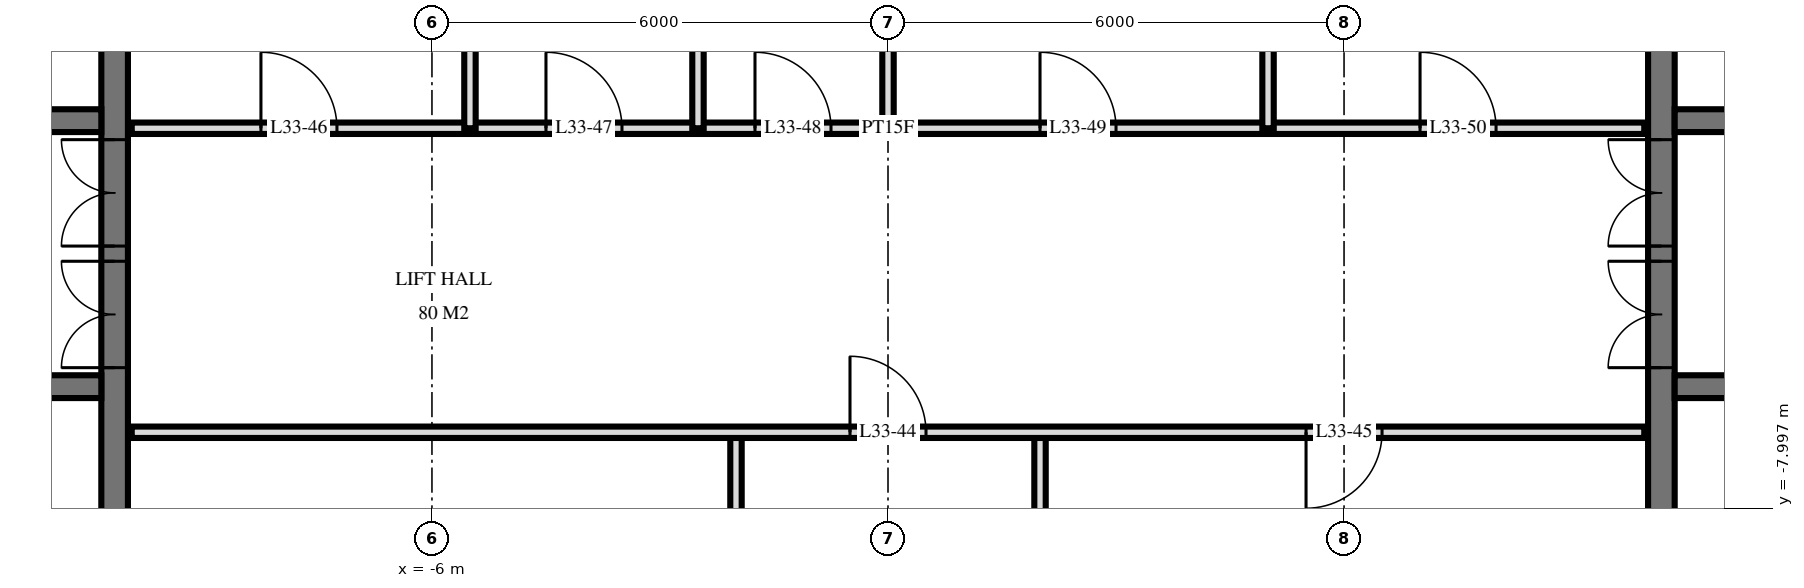
"""IFC4 building model, lengths in metres.
Left out: names, types, materials, properties, quantities, classifications, styles, units other than length and angle.
Written with IfcOpenShell. Run it as: python <this file> out.ifc"""

import sys

from ifc_helpers import new_model, si_unit, direction, frame, frame_2d, origin, place, context, subcontext, project, spatial, rectangle, extrude, element, fill, save


model = new_model("IFC4")
c1 = context("Model", 3, precision=1e-05, world=origin(), true_north=direction((0.0, 1.0)))
c2 = subcontext(c1, "Body", "Model", "MODEL_VIEW")
j1 = project(units=[si_unit("LENGTHUNIT", "METRE"), si_unit("PLANEANGLEUNIT", "RADIAN")], contexts=[c1])
p1 = place(None, origin())
s1 = spatial("IfcSite", under=j1, at=p1, CompositionType="ELEMENT")
p2 = place(p1, origin())
s2 = spatial("IfcBuilding", under=s1, at=p2, CompositionType="ELEMENT")
p3 = place(p2, frame((0.0, 0.0, 130.8)))
s3 = spatial("IfcBuildingStorey", under=s2, at=p3, CompositionType="ELEMENT", Elevation=130.8)
p4 = place(p3, frame((-10.175, -14.55, 0.0), z_axis=(0.0, 0.0, 1.0), x_axis=(0.0, 1.0, 0.0)))
e1 = element("IfcWall", 1, at=p4, inside=s3, PredefinedType="SHEAR", context=c2, shape_type="SweptSolid", body=[
    extrude(rectangle(XDim=14.1, YDim=0.35, at=frame_2d((7.05, 0.0))), origin(), (0.0, 0.0, 1.0), 3.6),
])
p5 = place(p4, frame((8.4, 0.0, 0.0)))
e2 = element("IfcOpeningElement", 2, at=p5, cuts=e1, PredefinedType="OPENING", context=c2, shape_type="SweptSolid", body=[
    extrude(rectangle(XDim=1.4, YDim=2.4, at=frame_2d((0.7, 1.2))), frame((0.0, 0.185, 0.0), z_axis=(0.0, -1.0, 0.0), x_axis=(1.0, 0.0, 0.0)), (0.0, 0.0, 1.0), 0.37),
])
p6 = place(p4, frame((10.0, 0.0, 0.0)))
e3 = element("IfcOpeningElement", 3, at=p6, cuts=e1, PredefinedType="OPENING", context=c2, shape_type="SweptSolid", body=[
    extrude(rectangle(XDim=1.4, YDim=2.4, at=frame_2d((0.7, 1.2))), frame((0.0, 0.185, 0.0), z_axis=(0.0, -1.0, 0.0), x_axis=(1.0, 0.0, 0.0)), (0.0, 0.0, 1.0), 0.37),
])
p7 = place(p4, frame((4.0, 0.0, 0.0)))
e4 = element("IfcOpeningElement", 4, at=p7, cuts=e1, PredefinedType="OPENING", context=c2, shape_type="SweptSolid", body=[
    extrude(rectangle(XDim=1.2, YDim=2.1, at=frame_2d((0.6, 1.05))), frame((0.0, 0.185, 0.0), z_axis=(0.0, -1.0, 0.0), x_axis=(1.0, 0.0, 0.0)), (0.0, 0.0, 1.0), 0.37),
])
p8 = place(p3, frame((-24.05, -2.9, 0.0), z_axis=(0.0, 0.0, 1.0), x_axis=(1.0, 0.0, 0.0)))
e5 = element("IfcWall", 5, at=p8, inside=s3, PredefinedType="SHEAR", context=c2, shape_type="SweptSolid", body=[
    extrude(rectangle(XDim=13.7, YDim=0.3, at=frame_2d((6.85, 0.0))), origin(), (0.0, 0.0, 1.0), 3.6),
])
p9 = place(p8, frame((0.55, 0.0, 0.0)))
e6 = element("IfcOpeningElement", 6, at=p9, cuts=e5, PredefinedType="OPENING", context=c2, shape_type="SweptSolid", body=[
    extrude(rectangle(XDim=1.1, YDim=2.1, at=frame_2d((0.55, 1.05))), frame((0.0, 0.16, 0.0), z_axis=(0.0, -1.0, 0.0), x_axis=(1.0, 0.0, 0.0)), (0.0, 0.0, 1.0), 0.32),
])
p10 = place(p8, frame((5.9, 0.0, 0.0)))
e7 = element("IfcOpeningElement", 7, at=p10, cuts=e5, PredefinedType="OPENING", context=c2, shape_type="SweptSolid", body=[
    extrude(rectangle(XDim=0.9, YDim=2.1, at=frame_2d((0.45, 1.05))), frame((0.0, 0.16, 0.0), z_axis=(0.0, -1.0, 0.0), x_axis=(1.0, 0.0, 0.0)), (0.0, 0.0, 1.0), 0.32),
])
p11 = place(p8, frame((11.85, 0.0, 0.0)))
e8 = element("IfcOpeningElement", 8, at=p11, cuts=e5, PredefinedType="OPENING", context=c2, shape_type="SweptSolid", body=[
    extrude(rectangle(XDim=1.0, YDim=2.1, at=frame_2d((0.5, 1.05))), frame((0.0, 0.16, 0.0), z_axis=(0.0, -1.0, 0.0), x_axis=(1.0, 0.0, 0.0)), (0.0, 0.0, 1.0), 0.32),
])
p12 = place(p8, frame((9.312, 0.0, 0.0)))
e9 = element("IfcOpeningElement", 9, at=p12, cuts=e5, PredefinedType="OPENING", context=c2, shape_type="SweptSolid", body=[
    extrude(rectangle(XDim=1.0, YDim=2.1, at=frame_2d((0.5, 1.05))), frame((0.0, 0.16, 0.0), z_axis=(0.0, -1.0, 0.0), x_axis=(1.0, 0.0, 0.0)), (0.0, 0.0, 1.0), 0.32),
])
p13 = place(p8, frame((7.887, 0.0, 0.0)))
e10 = element("IfcOpeningElement", 10, at=p13, cuts=e5, PredefinedType="OPENING", context=c2, shape_type="SweptSolid", body=[
    extrude(rectangle(XDim=1.0, YDim=2.1, at=frame_2d((0.5, 1.05))), frame((0.0, 0.16, 0.0), z_axis=(0.0, -1.0, 0.0), x_axis=(1.0, 0.0, 0.0)), (0.0, 0.0, 1.0), 0.32),
])
p14 = place(p8, frame((3.0, 0.0, 0.0)))
e11 = element("IfcOpeningElement", 11, at=p14, cuts=e5, PredefinedType="OPENING", context=c2, shape_type="SweptSolid", body=[
    extrude(rectangle(XDim=1.0, YDim=2.1, at=frame_2d((0.5, 1.05))), frame((0.0, 0.16, 0.0), z_axis=(0.0, -1.0, 0.0), x_axis=(1.0, 0.0, 0.0)), (0.0, 0.0, 1.0), 0.32),
])
p15 = place(p3, frame((-24.05, -6.4, 0.0), z_axis=(0.0, 0.0, 1.0), x_axis=(1.0, 0.0, 0.0)))
e12 = element("IfcWall", 12, at=p15, inside=s3, PredefinedType="SHEAR", context=c2, shape_type="SweptSolid", body=[
    extrude(rectangle(XDim=13.7, YDim=0.3, at=frame_2d((6.85, 0.0))), origin(), (0.0, 0.0, 1.0), 3.6),
])
p16 = place(p15, frame((0.55, 0.0, 0.0)))
e13 = element("IfcOpeningElement", 13, at=p16, cuts=e12, PredefinedType="OPENING", context=c2, shape_type="SweptSolid", body=[
    extrude(rectangle(XDim=1.1, YDim=2.1, at=frame_2d((0.55, 1.05))), frame((0.0, 0.16, 0.0), z_axis=(0.0, -1.0, 0.0), x_axis=(1.0, 0.0, 0.0)), (0.0, 0.0, 1.0), 0.32),
])
p17 = place(p15, frame((5.8, 0.0, 0.0)))
e14 = element("IfcOpeningElement", 14, at=p17, cuts=e12, PredefinedType="OPENING", context=c2, shape_type="SweptSolid", body=[
    extrude(rectangle(XDim=1.1, YDim=2.1, at=frame_2d((0.55, 1.05))), frame((0.0, 0.16, 0.0), z_axis=(0.0, -1.0, 0.0), x_axis=(1.0, 0.0, 0.0)), (0.0, 0.0, 1.0), 0.32),
])
p18 = place(p3, frame((10.175, -14.55, 0.0), z_axis=(0.0, 0.0, 1.0), x_axis=(0.0, 1.0, 0.0)))
e15 = element("IfcWall", 15, at=p18, inside=s3, PredefinedType="SHEAR", context=c2, shape_type="SweptSolid", body=[
    extrude(rectangle(XDim=14.1, YDim=0.35, at=frame_2d((7.05, 0.0))), origin(), (0.0, 0.0, 1.0), 3.6),
])
p19 = place(p18, frame((8.4, 0.0, 0.0)))
e16 = element("IfcOpeningElement", 16, at=p19, cuts=e15, PredefinedType="OPENING", context=c2, shape_type="SweptSolid", body=[
    extrude(rectangle(XDim=1.4, YDim=2.4, at=frame_2d((0.7, 1.2))), frame((0.0, 0.185, 0.0), z_axis=(0.0, -1.0, 0.0), x_axis=(1.0, 0.0, 0.0)), (0.0, 0.0, 1.0), 0.37),
])
p20 = place(p18, frame((10.0, 0.0, 0.0)))
e17 = element("IfcOpeningElement", 17, at=p20, cuts=e15, PredefinedType="OPENING", context=c2, shape_type="SweptSolid", body=[
    extrude(rectangle(XDim=1.4, YDim=2.4, at=frame_2d((0.7, 1.2))), frame((0.0, 0.185, 0.0), z_axis=(0.0, -1.0, 0.0), x_axis=(1.0, 0.0, 0.0)), (0.0, 0.0, 1.0), 0.37),
])
p21 = place(p18, frame((4.0, 0.0, 0.0)))
e18 = element("IfcOpeningElement", 18, at=p21, cuts=e15, PredefinedType="OPENING", context=c2, shape_type="SweptSolid", body=[
    extrude(rectangle(XDim=1.2, YDim=2.1, at=frame_2d((0.6, 1.05))), frame((0.0, 0.185, 0.0), z_axis=(0.0, -1.0, 0.0), x_axis=(1.0, 0.0, 0.0)), (0.0, 0.0, 1.0), 0.37),
])
p22 = place(p3, frame((10.35, -2.9, 0.0), z_axis=(0.0, 0.0, 1.0), x_axis=(1.0, 0.0, 0.0)))
e19 = element("IfcWall", 19, at=p22, inside=s3, PredefinedType="SHEAR", context=c2, shape_type="SweptSolid", body=[
    extrude(rectangle(XDim=13.7, YDim=0.3, at=frame_2d((6.85, 0.0))), origin(), (0.0, 0.0, 1.0), 3.6),
])
p23 = place(p22, frame((12.05, 0.0, 0.0)))
e20 = element("IfcOpeningElement", 20, at=p23, cuts=e19, PredefinedType="OPENING", context=c2, shape_type="SweptSolid", body=[
    extrude(rectangle(XDim=1.1, YDim=2.1, at=frame_2d((0.55, 1.05))), frame((0.0, 0.16, 0.0), z_axis=(0.0, -1.0, 0.0), x_axis=(1.0, 0.0, 0.0)), (0.0, 0.0, 1.0), 0.32),
])
p24 = place(p22, frame((6.9, 0.0, 0.0)))
e21 = element("IfcOpeningElement", 21, at=p24, cuts=e19, PredefinedType="OPENING", context=c2, shape_type="SweptSolid", body=[
    extrude(rectangle(XDim=0.9, YDim=2.1, at=frame_2d((0.45, 1.05))), frame((0.0, 0.16, 0.0), z_axis=(0.0, -1.0, 0.0), x_axis=(1.0, 0.0, 0.0)), (0.0, 0.0, 1.0), 0.32),
])
p25 = place(p22, frame((0.85, 0.0, 0.0)))
e22 = element("IfcOpeningElement", 22, at=p25, cuts=e19, PredefinedType="OPENING", context=c2, shape_type="SweptSolid", body=[
    extrude(rectangle(XDim=1.0, YDim=2.1, at=frame_2d((0.5, 1.05))), frame((0.0, 0.16, 0.0), z_axis=(0.0, -1.0, 0.0), x_axis=(1.0, 0.0, 0.0)), (0.0, 0.0, 1.0), 0.32),
])
p26 = place(p22, frame((3.387, 0.0, 0.0)))
e23 = element("IfcOpeningElement", 23, at=p26, cuts=e19, PredefinedType="OPENING", context=c2, shape_type="SweptSolid", body=[
    extrude(rectangle(XDim=1.0, YDim=2.1, at=frame_2d((0.5, 1.05))), frame((0.0, 0.16, 0.0), z_axis=(0.0, -1.0, 0.0), x_axis=(1.0, 0.0, 0.0)), (0.0, 0.0, 1.0), 0.32),
])
p27 = place(p22, frame((4.812, 0.0, 0.0)))
e24 = element("IfcOpeningElement", 24, at=p27, cuts=e19, PredefinedType="OPENING", context=c2, shape_type="SweptSolid", body=[
    extrude(rectangle(XDim=1.0, YDim=2.1, at=frame_2d((0.5, 1.05))), frame((0.0, 0.16, 0.0), z_axis=(0.0, -1.0, 0.0), x_axis=(1.0, 0.0, 0.0)), (0.0, 0.0, 1.0), 0.32),
])
p28 = place(p22, frame((9.7, 0.0, 0.0)))
e25 = element("IfcOpeningElement", 25, at=p28, cuts=e19, PredefinedType="OPENING", context=c2, shape_type="SweptSolid", body=[
    extrude(rectangle(XDim=1.0, YDim=2.1, at=frame_2d((0.5, 1.05))), frame((0.0, 0.16, 0.0), z_axis=(0.0, -1.0, 0.0), x_axis=(1.0, 0.0, 0.0)), (0.0, 0.0, 1.0), 0.32),
])
p29 = place(p3, frame((10.35, -6.4, 0.0), z_axis=(0.0, 0.0, 1.0), x_axis=(1.0, 0.0, 0.0)))
e26 = element("IfcWall", 26, at=p29, inside=s3, PredefinedType="SHEAR", context=c2, shape_type="SweptSolid", body=[
    extrude(rectangle(XDim=13.7, YDim=0.3, at=frame_2d((6.85, 0.0))), origin(), (0.0, 0.0, 1.0), 3.6),
])
p30 = place(p29, frame((12.05, 0.0, 0.0)))
e27 = element("IfcOpeningElement", 27, at=p30, cuts=e26, PredefinedType="OPENING", context=c2, shape_type="SweptSolid", body=[
    extrude(rectangle(XDim=1.1, YDim=2.1, at=frame_2d((0.55, 1.05))), frame((0.0, 0.16, 0.0), z_axis=(0.0, -1.0, 0.0), x_axis=(1.0, 0.0, 0.0)), (0.0, 0.0, 1.0), 0.32),
])
p31 = place(p29, frame((6.8, 0.0, 0.0)))
e28 = element("IfcOpeningElement", 28, at=p31, cuts=e26, PredefinedType="OPENING", context=c2, shape_type="SweptSolid", body=[
    extrude(rectangle(XDim=1.1, YDim=2.1, at=frame_2d((0.55, 1.05))), frame((0.0, 0.16, 0.0), z_axis=(0.0, -1.0, 0.0), x_axis=(1.0, 0.0, 0.0)), (0.0, 0.0, 1.0), 0.32),
])
p32 = place(p3, frame((5.0, -3.0, 0.0), z_axis=(0.0, 0.0, 1.0), x_axis=(0.0, 1.0, 0.0)))
e29 = element("IfcWall", 29, at=p32, inside=s3, PredefinedType="PARTITIONING", context=c2, shape_type="SweptSolid", body=[
    extrude(rectangle(XDim=4.02, YDim=0.15, at=frame_2d((2.01, 0.0))), origin(), (0.0, 0.0, 1.0), 3.32),
])
p33 = place(p3, frame((2.0, -11.0, 0.0), z_axis=(0.0, 0.0, 1.0), x_axis=(0.0, 1.0, 0.0)))
e30 = element("IfcWall", 30, at=p33, inside=s3, PredefinedType="PARTITIONING", context=c2, shape_type="SweptSolid", body=[
    extrude(rectangle(XDim=4.0, YDim=0.15, at=frame_2d((2.0, 0.0))), origin(), (0.0, 0.0, 1.0), 3.32),
])
p34 = place(p3, frame((0.0, -3.0, 0.0), z_axis=(0.0, 0.0, 1.0), x_axis=(0.0, 1.0, 0.0)))
e31 = element("IfcWall", 31, at=p34, inside=s3, PredefinedType="PLUMBINGWALL", context=c2, shape_type="SweptSolid", body=[
    extrude(rectangle(XDim=4.02, YDim=0.15, at=frame_2d((2.01, 0.0))), origin(), (0.0, 0.0, 1.0), 3.32),
])
p35 = place(p3, frame((-2.0, -11.0, 0.0), z_axis=(0.0, 0.0, 1.0), x_axis=(0.0, 1.0, 0.0)))
e32 = element("IfcWall", 32, at=p35, inside=s3, PredefinedType="PARTITIONING", context=c2, shape_type="SweptSolid", body=[
    extrude(rectangle(XDim=4.0, YDim=0.15, at=frame_2d((2.0, 0.0))), origin(), (0.0, 0.0, 1.0), 3.32),
])
for number, where, z_axis, x_axis in (
    (33, (-2.5, -3.0, 0.0), (0.0, 0.0, 1.0), (0.0, 1.0, 0.0)),
    (34, (-5.5, -3.0, 0.0), (0.0, 0.0, 1.0), (0.0, 1.0, 0.0)),
):
    element("IfcWall", number, at=place(p3, frame(where, z_axis=z_axis, x_axis=x_axis)), inside=s3, PredefinedType="PLUMBINGWALL", context=c2, shape_type="SweptSolid", body=[
        extrude(rectangle(XDim=4.02, YDim=0.15, at=frame_2d((2.01, 0.0))), origin(), (0.0, 0.0, 1.0), 3.32),
    ])
p36 = place(p3, frame((-9.95, -7.0, 0.0), z_axis=(0.0, 0.0, 1.0), x_axis=(1.0, 0.0, 0.0)))
e35 = element("IfcWall", 35, at=p36, inside=s3, PredefinedType="PARTITIONING", context=c2, shape_type="SweptSolid", body=[
    extrude(rectangle(XDim=19.9, YDim=0.15, at=frame_2d((9.95, 0.0))), origin(), (0.0, 0.0, 1.0), 3.32),
])
p37 = place(p36, frame((9.45, 0.0, 0.0)))
e36 = element("IfcOpeningElement", 36, at=p37, cuts=e35, PredefinedType="OPENING", context=c2, shape_type="SweptSolid", body=[
    extrude(rectangle(XDim=1.0, YDim=2.1, at=frame_2d((0.5, 1.05))), frame((0.0, 0.085, 0.0), z_axis=(0.0, -1.0, 0.0), x_axis=(1.0, 0.0, 0.0)), (0.0, 0.0, 1.0), 0.17),
])
p38 = place(p36, frame((15.45, 0.0, 0.0)))
e37 = element("IfcOpeningElement", 37, at=p38, cuts=e35, PredefinedType="OPENING", context=c2, shape_type="SweptSolid", body=[
    extrude(rectangle(XDim=1.0, YDim=2.1, at=frame_2d((0.5, 1.05))), frame((0.0, 0.085, 0.0), z_axis=(0.0, -1.0, 0.0), x_axis=(1.0, 0.0, 0.0)), (0.0, 0.0, 1.0), 0.17),
])
p39 = place(p3, frame((-9.95, -3.0, 0.0), z_axis=(0.0, 0.0, 1.0), x_axis=(1.0, 0.0, 0.0)))
e38 = element("IfcWall", 38, at=p39, inside=s3, PredefinedType="PARTITIONING", context=c2, shape_type="SweptSolid", body=[
    extrude(rectangle(XDim=19.9, YDim=0.15, at=frame_2d((9.95, 0.0))), origin(), (0.0, 0.0, 1.0), 3.32),
])
p40 = place(p39, frame((1.7, 0.0, 0.0)))
e39 = element("IfcOpeningElement", 39, at=p40, cuts=e38, PredefinedType="OPENING", context=c2, shape_type="SweptSolid", body=[
    extrude(rectangle(XDim=1.0, YDim=2.1, at=frame_2d((0.5, 1.05))), frame((0.0, 0.085, 0.0), z_axis=(0.0, -1.0, 0.0), x_axis=(1.0, 0.0, 0.0)), (0.0, 0.0, 1.0), 0.17),
])
p41 = place(p39, frame((5.45, 0.0, 0.0)))
e40 = element("IfcOpeningElement", 40, at=p41, cuts=e38, PredefinedType="OPENING", context=c2, shape_type="SweptSolid", body=[
    extrude(rectangle(XDim=1.0, YDim=2.1, at=frame_2d((0.5, 1.05))), frame((0.0, 0.085, 0.0), z_axis=(0.0, -1.0, 0.0), x_axis=(1.0, 0.0, 0.0)), (0.0, 0.0, 1.0), 0.17),
])
p42 = place(p39, frame((8.2, 0.0, 0.0)))
e41 = element("IfcOpeningElement", 41, at=p42, cuts=e38, PredefinedType="OPENING", context=c2, shape_type="SweptSolid", body=[
    extrude(rectangle(XDim=1.0, YDim=2.1, at=frame_2d((0.5, 1.05))), frame((0.0, 0.085, 0.0), z_axis=(0.0, -1.0, 0.0), x_axis=(1.0, 0.0, 0.0)), (0.0, 0.0, 1.0), 0.17),
])
p43 = place(p39, frame((11.95, 0.0, 0.0)))
e42 = element("IfcOpeningElement", 42, at=p43, cuts=e38, PredefinedType="OPENING", context=c2, shape_type="SweptSolid", body=[
    extrude(rectangle(XDim=1.0, YDim=2.1, at=frame_2d((0.5, 1.05))), frame((0.0, 0.085, 0.0), z_axis=(0.0, -1.0, 0.0), x_axis=(1.0, 0.0, 0.0)), (0.0, 0.0, 1.0), 0.17),
])
p44 = place(p39, frame((16.95, 0.0, 0.0)))
e43 = element("IfcOpeningElement", 43, at=p44, cuts=e38, PredefinedType="OPENING", context=c2, shape_type="SweptSolid", body=[
    extrude(rectangle(XDim=1.0, YDim=2.1, at=frame_2d((0.5, 1.05))), frame((0.0, 0.085, 0.0), z_axis=(0.0, -1.0, 0.0), x_axis=(1.0, 0.0, 0.0)), (0.0, 0.0, 1.0), 0.17),
])
p45 = place(p5, origin())
e44 = element("IfcDoor", 44, at=p45, inside=s3, OperationType="DOUBLE_DOOR_SINGLE_SWING", PredefinedType="DOOR", context=c2, shape_type="SweptSolid", body=[
    extrude(rectangle(XDim=1.4, YDim=2.4, at=frame_2d((0.7, 1.2))), frame((0.0, 0.025, 0.0), z_axis=(0.0, -1.0, 0.0), x_axis=(1.0, 0.0, 0.0)), (0.0, 0.0, 1.0), 0.05),
])
fill(e2, e44)
p46 = place(p6, origin())
e45 = element("IfcDoor", 45, at=p46, inside=s3, OperationType="DOUBLE_DOOR_SINGLE_SWING", PredefinedType="DOOR", context=c2, shape_type="SweptSolid", body=[
    extrude(rectangle(XDim=1.4, YDim=2.4, at=frame_2d((0.7, 1.2))), frame((0.0, 0.025, 0.0), z_axis=(0.0, -1.0, 0.0), x_axis=(1.0, 0.0, 0.0)), (0.0, 0.0, 1.0), 0.05),
])
fill(e3, e45)
p47 = place(p19, origin())
e46 = element("IfcDoor", 46, at=p47, inside=s3, OperationType="DOUBLE_DOOR_SINGLE_SWING", PredefinedType="DOOR", context=c2, shape_type="SweptSolid", body=[
    extrude(rectangle(XDim=1.4, YDim=2.4, at=frame_2d((0.7, 1.2))), frame((0.0, 0.025, 0.0), z_axis=(0.0, -1.0, 0.0), x_axis=(1.0, 0.0, 0.0)), (0.0, 0.0, 1.0), 0.05),
])
fill(e16, e46)
p48 = place(p20, origin())
e47 = element("IfcDoor", 47, at=p48, inside=s3, OperationType="DOUBLE_DOOR_SINGLE_SWING", PredefinedType="DOOR", context=c2, shape_type="SweptSolid", body=[
    extrude(rectangle(XDim=1.4, YDim=2.4, at=frame_2d((0.7, 1.2))), frame((0.0, 0.025, 0.0), z_axis=(0.0, -1.0, 0.0), x_axis=(1.0, 0.0, 0.0)), (0.0, 0.0, 1.0), 0.05),
])
fill(e17, e47)
p49 = place(p37, origin())
e48 = element("IfcDoor", 48, at=p49, inside=s3, OperationType="SINGLE_SWING_RIGHT", PredefinedType="DOOR", context=c2, shape_type="SweptSolid", body=[
    extrude(rectangle(XDim=1.0, YDim=2.1, at=frame_2d((0.5, 1.05))), frame((0.0, 0.025, 0.0), z_axis=(0.0, -1.0, 0.0), x_axis=(1.0, 0.0, 0.0)), (0.0, 0.0, 1.0), 0.05),
])
fill(e36, e48)
p50 = place(p38, frame((0.5, 0.0, 0.0), z_axis=(0.0, 0.0, 1.0), x_axis=(-1.0, 0.0, 0.0)))
e49 = element("IfcDoor", 49, at=p50, inside=s3, OperationType="SINGLE_SWING_LEFT", PredefinedType="DOOR", context=c2, shape_type="SweptSolid", body=[
    extrude(rectangle(XDim=1.0, YDim=2.1, at=frame_2d((0.0, 1.05))), frame((0.0, -0.025, 0.0), z_axis=(0.0, 1.0, 0.0), x_axis=(-1.0, 0.0, 0.0)), (0.0, 0.0, 1.0), 0.05),
])
fill(e37, e49)
p51 = place(p40, origin())
e50 = element("IfcDoor", 50, at=p51, inside=s3, OperationType="SINGLE_SWING_RIGHT", PredefinedType="DOOR", context=c2, shape_type="SweptSolid", body=[
    extrude(rectangle(XDim=1.0, YDim=2.1, at=frame_2d((0.5, 1.05))), frame((0.0, 0.025, 0.0), z_axis=(0.0, -1.0, 0.0), x_axis=(1.0, 0.0, 0.0)), (0.0, 0.0, 1.0), 0.05),
])
fill(e39, e50)
p52 = place(p41, origin())
e51 = element("IfcDoor", 51, at=p52, inside=s3, OperationType="SINGLE_SWING_RIGHT", PredefinedType="DOOR", context=c2, shape_type="SweptSolid", body=[
    extrude(rectangle(XDim=1.0, YDim=2.1, at=frame_2d((0.5, 1.05))), frame((0.0, 0.025, 0.0), z_axis=(0.0, -1.0, 0.0), x_axis=(1.0, 0.0, 0.0)), (0.0, 0.0, 1.0), 0.05),
])
fill(e40, e51)
p53 = place(p42, origin())
e52 = element("IfcDoor", 52, at=p53, inside=s3, OperationType="SINGLE_SWING_RIGHT", PredefinedType="DOOR", context=c2, shape_type="SweptSolid", body=[
    extrude(rectangle(XDim=1.0, YDim=2.1, at=frame_2d((0.5, 1.05))), frame((0.0, 0.025, 0.0), z_axis=(0.0, -1.0, 0.0), x_axis=(1.0, 0.0, 0.0)), (0.0, 0.0, 1.0), 0.05),
])
fill(e41, e52)
p54 = place(p43, origin())
e53 = element("IfcDoor", 53, at=p54, inside=s3, OperationType="SINGLE_SWING_RIGHT", PredefinedType="DOOR", context=c2, shape_type="SweptSolid", body=[
    extrude(rectangle(XDim=1.0, YDim=2.1, at=frame_2d((0.5, 1.05))), frame((0.0, 0.025, 0.0), z_axis=(0.0, -1.0, 0.0), x_axis=(1.0, 0.0, 0.0)), (0.0, 0.0, 1.0), 0.05),
])
fill(e42, e53)
p55 = place(p44, origin())
e54 = element("IfcDoor", 54, at=p55, inside=s3, OperationType="SINGLE_SWING_RIGHT", PredefinedType="DOOR", context=c2, shape_type="SweptSolid", body=[
    extrude(rectangle(XDim=1.0, YDim=2.1, at=frame_2d((0.5, 1.05))), frame((0.0, 0.025, 0.0), z_axis=(0.0, -1.0, 0.0), x_axis=(1.0, 0.0, 0.0)), (0.0, 0.0, 1.0), 0.05),
])
fill(e43, e54)
save(model, sys.argv[1])
